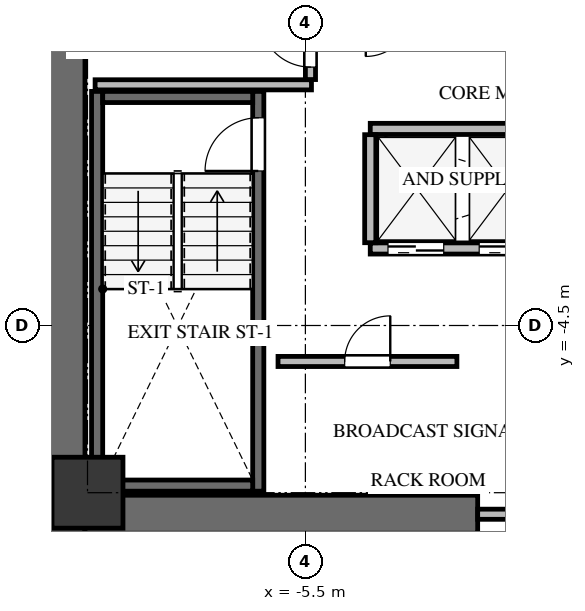
"""IFC4 building model, lengths in metres.
Left out: names, types, materials, properties, quantities, classifications, styles, units other than length and angle.
Written with IfcOpenShell. Run it as: python <this file> out.ifc"""

import sys

from ifc_helpers import new_model, si_unit, direction, frame, frame_2d, origin, origin_2d, place, context, subcontext, project, spatial, rectangle, extrude, source, transform, mapped, element, fill, save


model = new_model("IFC4")
c1 = context("Model", 3, precision=1e-05, world=origin(), true_north=direction((0.0, 1.0)))
c2 = subcontext(c1, "Body", "Model", "MODEL_VIEW")
j1 = project(units=[si_unit("LENGTHUNIT", "METRE"), si_unit("PLANEANGLEUNIT", "RADIAN")], contexts=[c1])
p1 = place(None, origin())
s1 = spatial("IfcSite", under=j1, at=p1, CompositionType="ELEMENT")
p2 = place(p1, origin())
s2 = spatial("IfcBuilding", under=s1, at=p2, CompositionType="ELEMENT")
p3 = place(p2, frame((0.0, 0.0, 143.1)))
s3 = spatial("IfcBuildingStorey", under=s2, at=p3, CompositionType="ELEMENT", Elevation=143.1)
p4 = place(p3, frame((-10.225, -8.6, 0.0), z_axis=(0.0, 0.0, 1.0), x_axis=(0.0, 1.0, 0.0)))
e1 = element("IfcWall", 1, at=p4, inside=s3, PredefinedType="SHEAR", context=c2, shape_type="SweptSolid", body=[
    extrude(rectangle(XDim=17.2, YDim=0.75, at=frame_2d((8.6, 0.0))), origin(), (0.0, 0.0, 1.0), 3.0),
])
p5 = place(p3, frame((-9.85, -8.225, 0.0), z_axis=(0.0, 0.0, 1.0), x_axis=(1.0, 0.0, 0.0)))
e2 = element("IfcWall", 2, at=p5, inside=s3, PredefinedType="SHEAR", context=c2, shape_type="SweptSolid", body=[
    extrude(rectangle(XDim=7.75, YDim=0.75, at=frame_2d((3.875, 0.0))), origin(), (0.0, 0.0, 1.0), 3.0),
])
p6 = place(p3, frame((-6.43, -7.77, -0.24), z_axis=(0.0, 0.0, 1.0), x_axis=(0.0, 1.0, 0.0)))
e3 = element("IfcWall", 3, at=p6, inside=s3, PredefinedType="SHEAR", context=c2, shape_type="SweptSolid", body=[
    extrude(rectangle(XDim=7.89, YDim=0.22, at=frame_2d((3.945, 0.0))), origin(), (0.0, 0.0, 1.0), 3.0),
])
p7 = place(p6, frame((6.32, 0.0, 0.0)))
e4 = element("IfcOpeningElement", 4, at=p7, cuts=e3, PredefinedType="OPENING", context=c2, shape_type="SweptSolid", body=[
    extrude(rectangle(XDim=1.05, YDim=2.15, at=frame_2d((0.525, 1.075))), frame((0.0, 0.12, 0.0), z_axis=(0.0, -1.0, 0.0), x_axis=(1.0, 0.0, 0.0)), (0.0, 0.0, 1.0), 0.24),
])
p8 = place(p3, frame((-9.61, 0.12, -0.24), z_axis=(0.0, 0.0, 1.0), x_axis=(0.0, -1.0, 0.0)))
e5 = element("IfcWall", 5, at=p8, inside=s3, PredefinedType="SHEAR", context=c2, shape_type="SweptSolid", body=[
    extrude(rectangle(XDim=7.89, YDim=0.22, at=frame_2d((3.945, 0.0))), origin(), (0.0, 0.0, 1.0), 3.0),
])
for number, where, z_axis, x_axis in (
    (6, (-9.5, -7.66, -0.24), (0.0, 0.0, 1.0), (1.0, 0.0, 0.0)),
    (7, (-6.54, 0.01, -0.24), (0.0, 0.0, 1.0), (-1.0, 0.0, 0.0)),
):
    element("IfcWall", number, at=place(p3, frame(where, z_axis=z_axis, x_axis=x_axis)), inside=s3, PredefinedType="SHEAR", context=c2, shape_type="SweptSolid", body=[
        extrude(rectangle(XDim=2.96, YDim=0.22, at=frame_2d((1.48, 0.0))), origin(), (0.0, 0.0, 1.0), 3.0),
    ])
m1 = source(origin(), c2, "Body", "SweptSolid", [
    extrude(rectangle(XDim=1.4, YDim=1.4, at=origin_2d()), origin(), (0.0, 0.0, 1.0), 3.0),
])
p9 = place(p3, frame((-9.8, -7.8, -0.24), z_axis=(0.0, 0.0, 1.0), x_axis=(1.0, 0.0, 0.0)))
e8 = element("IfcColumn", 8, at=p9, inside=s3, PredefinedType="COLUMN", context=c2, shape_type="MappedRepresentation", body=[
    mapped(m1, transform((0.0, 0.0, 0.0), x_axis=(1.0, 0.0, 0.0), y_axis=(0.0, 1.0, 0.0), z_axis=(0.0, 0.0, 1.0), scale=1.0)),
])
p10 = place(p3, frame((-2.1, -8.225, 0.0), z_axis=(0.0, 0.0, 1.0), x_axis=(1.0, 0.0, 0.0)))
e9 = element("IfcWall", 9, at=p10, inside=s3, PredefinedType="SOLIDWALL", context=c2, shape_type="SweptSolid", body=[
    extrude(rectangle(XDim=4.2, YDim=0.2, at=frame_2d((2.1, 0.0))), origin(), (0.0, 0.0, 1.0), 2.745),
])
p11 = place(p10, frame((1.2, 0.0, 0.0)))
e10 = element("IfcOpeningElement", 10, at=p11, cuts=e9, PredefinedType="OPENING", context=c2, shape_type="SweptSolid", body=[
    extrude(rectangle(XDim=1.8, YDim=2.15, at=frame_2d((0.9, 1.075))), frame((0.0, 0.11, 0.0), z_axis=(0.0, -1.0, 0.0), x_axis=(1.0, 0.0, 0.0)), (0.0, 0.0, 1.0), 0.22),
])
p12 = place(p3, frame((-9.65, 0.25, 0.0), z_axis=(0.0, 0.0, 1.0), x_axis=(1.0, 0.0, 0.0)))
e11 = element("IfcWall", 11, at=p12, inside=s3, PredefinedType="SOLIDWALL", context=c2, shape_type="SweptSolid", body=[
    extrude(rectangle(XDim=4.27, YDim=0.2, at=frame_2d((2.135, 0.0))), origin(), (0.0, 0.0, 1.0), 2.745),
])
p13 = place(p3, frame((-5.4, 0.354, 0.0), z_axis=(0.0, 0.0, 1.0), x_axis=(0.0, 1.0, 0.0)))
e12 = element("IfcWall", 12, at=p13, inside=s3, PredefinedType="SOLIDWALL", context=c2, shape_type="SweptSolid", body=[
    extrude(rectangle(XDim=4.026, YDim=0.2, at=frame_2d((2.013, 0.0))), origin(), (0.0, 0.0, 1.0), 2.745),
])
p14 = place(p13, frame((0.246, 0.0, 0.0)))
e13 = element("IfcOpeningElement", 13, at=p14, cuts=e12, PredefinedType="OPENING", context=c2, shape_type="SweptSolid", body=[
    extrude(rectangle(XDim=1.0, YDim=2.15, at=frame_2d((0.5, 1.075))), frame((0.0, 0.11, 0.0), z_axis=(0.0, -1.0, 0.0), x_axis=(1.0, 0.0, 0.0)), (0.0, 0.0, 1.0), 0.22),
])
p15 = place(p3, frame((-4.22, -2.98, 0.0), z_axis=(0.0, 0.0, 1.0), x_axis=(1.0, 0.0, 0.0)))
e14 = element("IfcWall", 14, at=p15, inside=s3, PredefinedType="SOLIDWALL", context=c2, shape_type="SweptSolid", body=[
    extrude(rectangle(XDim=7.24, YDim=0.22, at=frame_2d((3.62, 0.0))), origin(), (0.0, 0.0, 1.0), 2.745),
])
p16 = place(p15, frame((0.35, 0.0, 0.0)))
e15 = element("IfcOpeningElement", 15, at=p16, cuts=e14, PredefinedType="OPENING", context=c2, shape_type="SweptSolid", body=[
    extrude(rectangle(XDim=1.1, YDim=2.15, at=frame_2d((0.55, 1.075))), frame((0.0, 0.12, 0.0), z_axis=(0.0, -1.0, 0.0), x_axis=(1.0, 0.0, 0.0)), (0.0, 0.0, 1.0), 0.24),
])
p17 = place(p15, frame((2.15, 0.0, 0.0)))
e16 = element("IfcOpeningElement", 16, at=p17, cuts=e14, PredefinedType="OPENING", context=c2, shape_type="SweptSolid", body=[
    extrude(rectangle(XDim=1.1, YDim=2.15, at=frame_2d((0.55, 1.075))), frame((0.0, 0.12, 0.0), z_axis=(0.0, -1.0, 0.0), x_axis=(1.0, 0.0, 0.0)), (0.0, 0.0, 1.0), 0.24),
])
p18 = place(p15, frame((3.95, 0.0, 0.0)))
e17 = element("IfcOpeningElement", 17, at=p18, cuts=e14, PredefinedType="OPENING", context=c2, shape_type="SweptSolid", body=[
    extrude(rectangle(XDim=1.1, YDim=2.15, at=frame_2d((0.55, 1.075))), frame((0.0, 0.12, 0.0), z_axis=(0.0, -1.0, 0.0), x_axis=(1.0, 0.0, 0.0)), (0.0, 0.0, 1.0), 0.24),
])
p19 = place(p15, frame((5.75, 0.0, 0.0)))
e18 = element("IfcOpeningElement", 18, at=p19, cuts=e14, PredefinedType="OPENING", context=c2, shape_type="SweptSolid", body=[
    extrude(rectangle(XDim=1.1, YDim=2.15, at=frame_2d((0.55, 1.075))), frame((0.0, 0.12, 0.0), z_axis=(0.0, -1.0, 0.0), x_axis=(1.0, 0.0, 0.0)), (0.0, 0.0, 1.0), 0.24),
])
p20 = place(p3, frame((-4.22, -0.62, 0.0), z_axis=(0.0, 0.0, 1.0), x_axis=(1.0, 0.0, 0.0)))
e19 = element("IfcWall", 19, at=p20, inside=s3, PredefinedType="SOLIDWALL", context=c2, shape_type="SweptSolid", body=[
    extrude(rectangle(XDim=7.24, YDim=0.22, at=frame_2d((3.62, 0.0))), origin(), (0.0, 0.0, 1.0), 2.745),
])
p21 = place(p3, frame((-4.22, -2.866, 0.0), z_axis=(0.0, 0.0, 1.0), x_axis=(0.0, 1.0, 0.0)))
e20 = element("IfcWall", 20, at=p21, inside=s3, PredefinedType="SOLIDWALL", context=c2, shape_type="SweptSolid", body=[
    extrude(rectangle(XDim=2.132, YDim=0.22, at=frame_2d((1.066, 0.0))), origin(), (0.0, 0.0, 1.0), 2.745),
])
p22 = place(p3, frame((-6.04, -5.21, 0.0), z_axis=(0.0, 0.0, 1.0), x_axis=(1.0, 0.0, 0.0)))
e21 = element("IfcWall", 21, at=p22, inside=s3, PredefinedType="SOLIDWALL", context=c2, shape_type="SweptSolid", body=[
    extrude(rectangle(XDim=3.53, YDim=0.2, at=frame_2d((1.765, 0.0))), origin(), (0.0, 0.0, 1.0), 2.745),
])
p23 = place(p22, frame((1.315, 0.0, 0.0)))
e22 = element("IfcOpeningElement", 22, at=p23, cuts=e21, PredefinedType="OPENING", context=c2, shape_type="SweptSolid", body=[
    extrude(rectangle(XDim=0.9, YDim=2.05, at=frame_2d((0.45, 1.025))), frame((0.0, 0.11, 0.0), z_axis=(0.0, -1.0, 0.0), x_axis=(1.0, 0.0, 0.0)), (0.0, 0.0, 1.0), 0.22),
])
m2 = source(origin(), c2, "Body", "SweptSolid", [
    extrude(rectangle(XDim=1.05, YDim=2.15, at=frame_2d((0.525, 1.075))), frame((0.0, 0.025, 0.0), z_axis=(0.0, -1.0, 0.0), x_axis=(1.0, 0.0, 0.0)), (0.0, 0.0, 1.0), 0.05),
])
p24 = place(p7, origin())
e23 = element("IfcDoor", 23, at=p24, inside=s3, OperationType="SINGLE_SWING_LEFT", PredefinedType="DOOR", context=c2, shape_type="MappedRepresentation", body=[
    mapped(m2, transform((0.0, 0.0, 0.0), x_axis=(1.0, 0.0, 0.0), y_axis=(0.0, 1.0, 0.0), z_axis=(0.0, 0.0, 1.0), scale=1.0)),
])
fill(e4, e23)
m3 = source(origin(), c2, "Body", "SweptSolid", [
    extrude(rectangle(XDim=1.0, YDim=2.15, at=frame_2d((0.5, 1.075))), frame((0.0, 0.025, 0.0), z_axis=(0.0, -1.0, 0.0), x_axis=(1.0, 0.0, 0.0)), (0.0, 0.0, 1.0), 0.05),
])
p25 = place(p14, origin())
e24 = element("IfcDoor", 24, at=p25, inside=s3, OperationType="SINGLE_SWING_RIGHT", PredefinedType="DOOR", context=c2, shape_type="MappedRepresentation", body=[
    mapped(m3, transform((0.0, 0.0, 0.0), x_axis=(1.0, 0.0, 0.0), y_axis=(0.0, 1.0, 0.0), z_axis=(0.0, 0.0, 1.0), scale=1.0)),
])
fill(e13, e24)
m4 = source(origin(), c2, "Body", "SweptSolid", [
    extrude(rectangle(XDim=1.1, YDim=2.15, at=frame_2d((0.55, 1.075))), frame((0.0, 0.025, 0.0), z_axis=(0.0, -1.0, 0.0), x_axis=(1.0, 0.0, 0.0)), (0.0, 0.0, 1.0), 0.05),
])
p26 = place(p16, origin())
e25 = element("IfcDoor", 25, at=p26, inside=s3, OperationType="DOUBLE_DOOR_SLIDING", PredefinedType="DOOR", context=c2, shape_type="MappedRepresentation", body=[
    mapped(m4, transform((0.0, 0.0, 0.0), x_axis=(1.0, 0.0, 0.0), y_axis=(0.0, 1.0, 0.0), z_axis=(0.0, 0.0, 1.0), scale=1.0)),
])
fill(e15, e25)
p27 = place(p17, origin())
e26 = element("IfcDoor", 26, at=p27, inside=s3, OperationType="DOUBLE_DOOR_SLIDING", PredefinedType="DOOR", context=c2, shape_type="MappedRepresentation", body=[
    mapped(m4, transform((0.0, 0.0, 0.0), x_axis=(1.0, 0.0, 0.0), y_axis=(0.0, 1.0, 0.0), z_axis=(0.0, 0.0, 1.0), scale=1.0)),
])
fill(e16, e26)
m5 = source(origin(), c2, "Body", "SweptSolid", [
    extrude(rectangle(XDim=0.9, YDim=2.05, at=frame_2d((0.45, 1.025))), frame((0.0, 0.025, 0.0), z_axis=(0.0, -1.0, 0.0), x_axis=(1.0, 0.0, 0.0)), (0.0, 0.0, 1.0), 0.05),
])
p28 = place(p23, origin())
e27 = element("IfcDoor", 27, at=p28, inside=s3, OperationType="SINGLE_SWING_RIGHT", PredefinedType="DOOR", context=c2, shape_type="MappedRepresentation", body=[
    mapped(m5, transform((0.0, 0.0, 0.0), x_axis=(1.0, 0.0, 0.0), y_axis=(0.0, 1.0, 0.0), z_axis=(0.0, 0.0, 1.0), scale=1.0)),
])
fill(e22, e27)
save(model, sys.argv[1])
